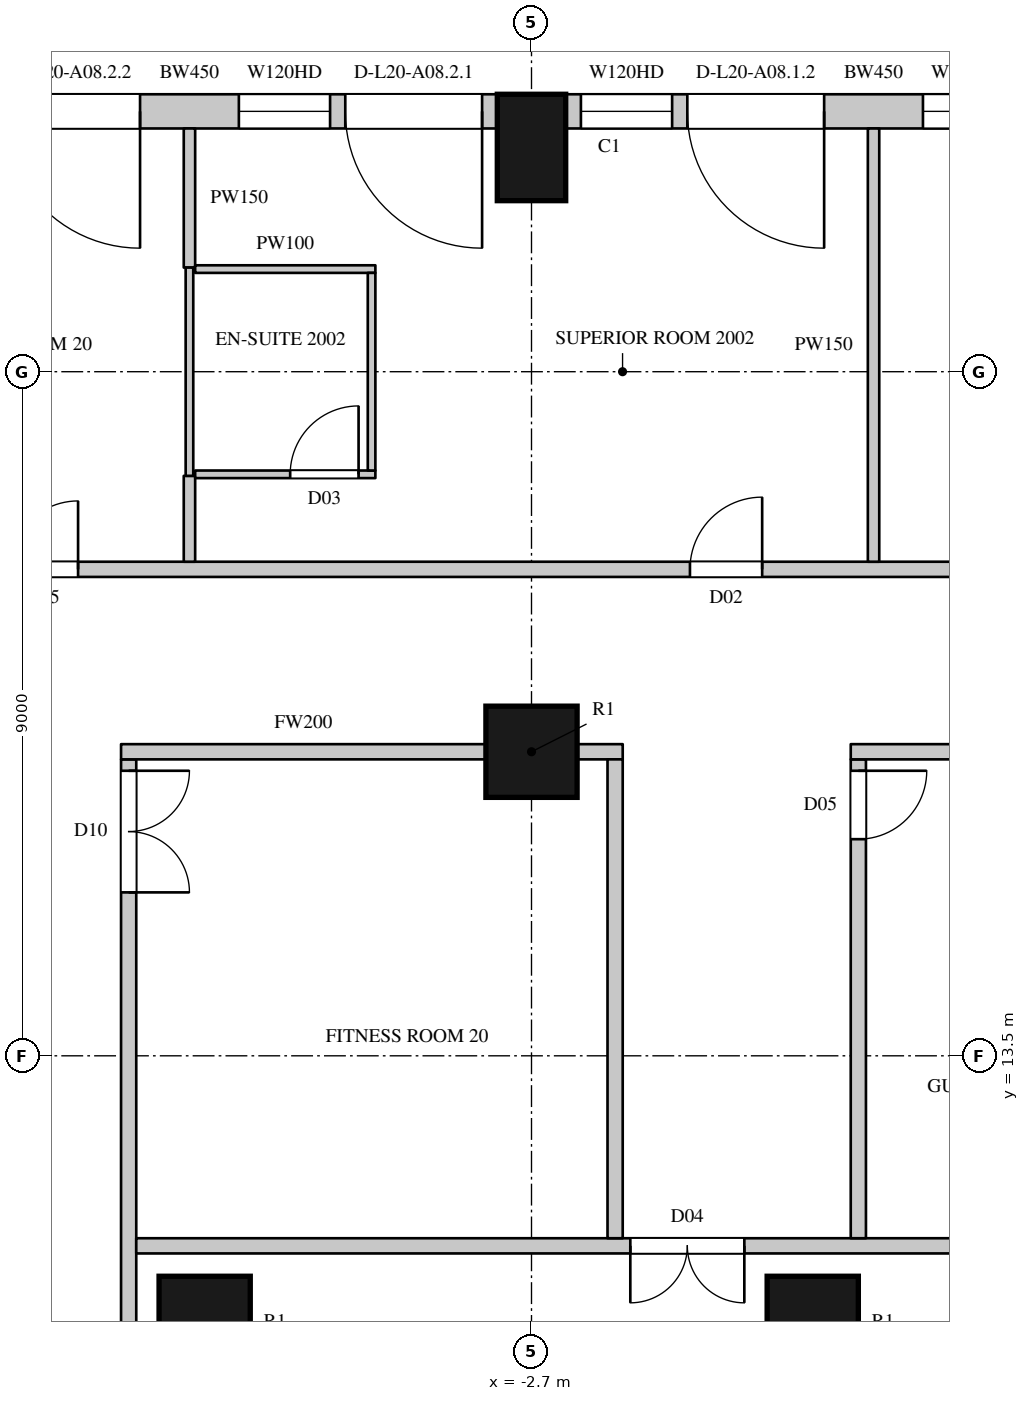
"""IFC4 building model, lengths in metres.
Left out: names, types, materials, properties, quantities, classifications, styles, units other than length and angle.
Written with IfcOpenShell. Run it as: python <this file> out.ifc"""

import sys

from ifc_helpers import new_model, si_unit, direction, frame, frame_2d, origin, origin_2d, place, context, subcontext, project, spatial, rectangle, circle, extrude, element, fill, save


model = new_model("IFC4")
c1 = context("Model", 3, precision=1e-05, world=origin(), true_north=direction((0.0, 1.0)))
c2 = subcontext(c1, "Body", "Model", "MODEL_VIEW")
j1 = project(units=[si_unit("LENGTHUNIT", "METRE"), si_unit("PLANEANGLEUNIT", "RADIAN")], contexts=[c1])
p1 = place(None, origin())
s1 = spatial("IfcSite", under=j1, at=p1, CompositionType="ELEMENT")
p2 = place(p1, origin())
s2 = spatial("IfcBuilding", under=s1, at=p2, CompositionType="ELEMENT")
p3 = place(p2, frame((0.0, 0.0, 102.3)))
s3 = spatial("IfcBuildingStorey", under=s2, at=p3, CompositionType="ELEMENT", Elevation=102.3)
p4 = place(p3, frame((-2.7, 25.45, 0.0), z_axis=(0.0, 0.0, 1.0), x_axis=(-1.0, 0.0, 0.0)))
e1 = element("IfcColumn", 1, at=p4, inside=s3, PredefinedType="COLUMN", context=c2, shape_type="SweptSolid", body=[
    extrude(rectangle(XDim=0.9, YDim=1.4, at=origin_2d()), origin(), (0.0, 0.0, 1.0), 3.6),
])
for number, where, z_axis, x_axis in (
    (2, (-2.7, 17.5, 0.0), (0.0, 0.0, 1.0), (1.0, 0.0, 0.0)),
    (3, (-7.0, 10.0, 0.0), (0.0, 0.0, 1.0), (1.0, 0.0, 0.0)),
    (4, (1.0, 10.0, 0.0), (0.0, 0.0, 1.0), (1.0, 0.0, 0.0)),
):
    element("IfcColumn", number, at=place(p3, frame(where, z_axis=z_axis, x_axis=x_axis)), inside=s3, PredefinedType="COLUMN", context=c2, shape_type="SweptSolid", body=[
        extrude(circle(Radius=0.6, at=origin_2d()), origin(), (0.0, 0.0, 1.0), 3.6),
    ])
p5 = place(p3, frame((5.85, 25.925, 0.0), z_axis=(0.0, 0.0, 1.0), x_axis=(-1.0, 0.0, 0.0)))
e5 = element("IfcWall", 5, at=p5, inside=s3, PredefinedType="SOLIDWALL", context=c2, shape_type="SweptSolid", body=[
    extrude(rectangle(XDim=8.1, YDim=0.45, at=frame_2d((4.05, 0.0))), origin(), (0.0, 0.0, 1.0), 3.3),
])
p6 = place(p5, frame((0.2, 0.0, 0.0)))
e6 = element("IfcOpeningElement", 6, at=p6, cuts=e5, PredefinedType="OPENING", context=c2, shape_type="SweptSolid", body=[
    extrude(rectangle(XDim=1.8, YDim=2.4, at=frame_2d((0.9, 1.2))), frame((0.0, 0.235, 0.0), z_axis=(0.0, -1.0, 0.0), x_axis=(1.0, 0.0, 0.0)), (0.0, 0.0, 1.0), 0.47),
])
p7 = place(p5, frame((2.2, 0.0, 1.05)))
e7 = element("IfcOpeningElement", 7, at=p7, cuts=e5, PredefinedType="OPENING", context=c2, shape_type="SweptSolid", body=[
    extrude(rectangle(XDim=1.2, YDim=2.0, at=frame_2d((0.6, 1.0))), frame((0.0, 0.235, 0.0), z_axis=(0.0, -1.0, 0.0), x_axis=(1.0, 0.0, 0.0)), (0.0, 0.0, 1.0), 0.47),
])
p8 = place(p5, frame((4.7, 0.0, 0.0)))
e8 = element("IfcOpeningElement", 8, at=p8, cuts=e5, PredefinedType="OPENING", context=c2, shape_type="SweptSolid", body=[
    extrude(rectangle(XDim=1.8, YDim=2.4, at=frame_2d((0.9, 1.2))), frame((0.0, 0.235, 0.0), z_axis=(0.0, -1.0, 0.0), x_axis=(1.0, 0.0, 0.0)), (0.0, 0.0, 1.0), 0.47),
])
p9 = place(p5, frame((6.7, 0.0, 1.05)))
e9 = element("IfcOpeningElement", 9, at=p9, cuts=e5, PredefinedType="OPENING", context=c2, shape_type="SweptSolid", body=[
    extrude(rectangle(XDim=1.2, YDim=2.0, at=frame_2d((0.6, 1.0))), frame((0.0, 0.235, 0.0), z_axis=(0.0, -1.0, 0.0), x_axis=(1.0, 0.0, 0.0)), (0.0, 0.0, 1.0), 0.47),
])
p10 = place(p3, frame((-3.15, 25.925, 0.0), z_axis=(0.0, 0.0, 1.0), x_axis=(-1.0, 0.0, 0.0)))
e10 = element("IfcWall", 10, at=p10, inside=s3, PredefinedType="SOLIDWALL", context=c2, shape_type="SweptSolid", body=[
    extrude(rectangle(XDim=8.1, YDim=0.45, at=frame_2d((4.05, 0.0))), origin(), (0.0, 0.0, 1.0), 3.3),
])
p11 = place(p10, frame((0.2, 0.0, 0.0)))
e11 = element("IfcOpeningElement", 11, at=p11, cuts=e10, PredefinedType="OPENING", context=c2, shape_type="SweptSolid", body=[
    extrude(rectangle(XDim=1.8, YDim=2.4, at=frame_2d((0.9, 1.2))), frame((0.0, 0.235, 0.0), z_axis=(0.0, -1.0, 0.0), x_axis=(1.0, 0.0, 0.0)), (0.0, 0.0, 1.0), 0.47),
])
p12 = place(p10, frame((2.2, 0.0, 1.05)))
e12 = element("IfcOpeningElement", 12, at=p12, cuts=e10, PredefinedType="OPENING", context=c2, shape_type="SweptSolid", body=[
    extrude(rectangle(XDim=1.2, YDim=2.0, at=frame_2d((0.6, 1.0))), frame((0.0, 0.235, 0.0), z_axis=(0.0, -1.0, 0.0), x_axis=(1.0, 0.0, 0.0)), (0.0, 0.0, 1.0), 0.47),
])
p13 = place(p10, frame((4.7, 0.0, 0.0)))
e13 = element("IfcOpeningElement", 13, at=p13, cuts=e10, PredefinedType="OPENING", context=c2, shape_type="SweptSolid", body=[
    extrude(rectangle(XDim=1.8, YDim=2.4, at=frame_2d((0.9, 1.2))), frame((0.0, 0.235, 0.0), z_axis=(0.0, -1.0, 0.0), x_axis=(1.0, 0.0, 0.0)), (0.0, 0.0, 1.0), 0.47),
])
p14 = place(p10, frame((6.7, 0.0, 1.05)))
e14 = element("IfcOpeningElement", 14, at=p14, cuts=e10, PredefinedType="OPENING", context=c2, shape_type="SweptSolid", body=[
    extrude(rectangle(XDim=1.2, YDim=2.0, at=frame_2d((0.6, 1.0))), frame((0.0, 0.235, 0.0), z_axis=(0.0, -1.0, 0.0), x_axis=(1.0, 0.0, 0.0)), (0.0, 0.0, 1.0), 0.47),
])
p15 = place(p3, frame((-23.765, 19.9, 0.0), z_axis=(0.0, 0.0, 1.0), x_axis=(1.0, 0.0, 0.0)))
e15 = element("IfcWall", 15, at=p15, inside=s3, PredefinedType="PARTITIONING", context=c2, shape_type="SweptSolid", body=[
    extrude(rectangle(XDim=41.549, YDim=0.2, at=frame_2d((20.774, 0.0))), origin(), (0.0, 0.0, 1.0), 3.3),
])
p16 = place(p15, frame((14.2, 0.0, 0.0)))
e16 = element("IfcOpeningElement", 16, at=p16, cuts=e15, PredefinedType="OPENING", context=c2, shape_type="SweptSolid", body=[
    extrude(rectangle(XDim=0.9, YDim=2.2, at=frame_2d((0.45, 1.1))), frame((0.0, 0.11, 0.0), z_axis=(0.0, -1.0, 0.0), x_axis=(1.0, 0.0, 0.0)), (0.0, 0.0, 1.0), 0.22),
])
p17 = place(p15, frame((27.05, 0.0, 0.0)))
e17 = element("IfcOpeningElement", 17, at=p17, cuts=e15, PredefinedType="OPENING", context=c2, shape_type="SweptSolid", body=[
    extrude(rectangle(XDim=0.9, YDim=2.2, at=frame_2d((0.45, 1.1))), frame((0.0, 0.11, 0.0), z_axis=(0.0, -1.0, 0.0), x_axis=(1.0, 0.0, 0.0)), (0.0, 0.0, 1.0), 0.22),
])
p18 = place(p15, frame((0.75, 0.0, 0.0)))
e18 = element("IfcOpeningElement", 18, at=p18, cuts=e15, PredefinedType="OPENING", context=c2, shape_type="SweptSolid", body=[
    extrude(rectangle(XDim=1.1, YDim=2.4, at=frame_2d((0.55, 1.2))), frame((0.0, 0.11, 0.0), z_axis=(0.0, -1.0, 0.0), x_axis=(1.0, 0.0, 0.0)), (0.0, 0.0, 1.0), 0.22),
])
p19 = place(p15, frame((23.15, 0.0, 0.0)))
e19 = element("IfcOpeningElement", 19, at=p19, cuts=e15, PredefinedType="OPENING", context=c2, shape_type="SweptSolid", body=[
    extrude(rectangle(XDim=0.95, YDim=2.2, at=frame_2d((0.475, 1.1))), frame((0.0, 0.11, 0.0), z_axis=(0.0, -1.0, 0.0), x_axis=(1.0, 0.0, 0.0)), (0.0, 0.0, 1.0), 0.22),
])
p20 = place(p15, frame((34.95, 0.0, 0.0)))
e20 = element("IfcOpeningElement", 20, at=p20, cuts=e15, PredefinedType="OPENING", context=c2, shape_type="SweptSolid", body=[
    extrude(rectangle(XDim=0.95, YDim=2.2, at=frame_2d((0.475, 1.1))), frame((0.0, 0.11, 0.0), z_axis=(0.0, -1.0, 0.0), x_axis=(1.0, 0.0, 0.0)), (0.0, 0.0, 1.0), 0.22),
])
p21 = place(p3, frame((-8.0, -10.9, 0.0), z_axis=(0.0, 0.0, 1.0), x_axis=(0.0, 1.0, 0.0)))
e21 = element("IfcWall", 21, at=p21, inside=s3, PredefinedType="PARTITIONING", context=c2, shape_type="SweptSolid", body=[
    extrude(rectangle(XDim=28.3, YDim=0.2, at=frame_2d((14.15, 0.0))), origin(), (0.0, 0.0, 1.0), 3.3),
])
p22 = place(p21, frame((14.65, 0.0, 0.0)))
e22 = element("IfcOpeningElement", 22, at=p22, cuts=e21, PredefinedType="OPENING", context=c2, shape_type="SweptSolid", body=[
    extrude(rectangle(XDim=1.5, YDim=2.2, at=frame_2d((0.75, 1.1))), frame((0.0, 0.11, 0.0), z_axis=(0.0, -1.0, 0.0), x_axis=(1.0, 0.0, 0.0)), (0.0, 0.0, 1.0), 0.22),
])
p23 = place(p21, frame((26.55, 0.0, 0.0)))
e23 = element("IfcOpeningElement", 23, at=p23, cuts=e21, PredefinedType="OPENING", context=c2, shape_type="SweptSolid", body=[
    extrude(rectangle(XDim=1.6, YDim=2.4, at=frame_2d((0.8, 1.2))), frame((0.0, 0.11, 0.0), z_axis=(0.0, -1.0, 0.0), x_axis=(1.0, 0.0, 0.0)), (0.0, 0.0, 1.0), 0.22),
])
p24 = place(p3, frame((-7.9, 11.0, 0.0), z_axis=(0.0, 0.0, 1.0), x_axis=(1.0, 0.0, 0.0)))
e24 = element("IfcWall", 24, at=p24, inside=s3, PredefinedType="PARTITIONING", context=c2, shape_type="SweptSolid", body=[
    extrude(rectangle(XDim=17.9, YDim=0.2, at=frame_2d((8.95, 0.0))), origin(), (0.0, 0.0, 1.0), 3.3),
])
p25 = place(p24, frame((6.5, 0.0, 0.0)))
e25 = element("IfcOpeningElement", 25, at=p25, cuts=e24, PredefinedType="OPENING", context=c2, shape_type="SweptSolid", body=[
    extrude(rectangle(XDim=1.5, YDim=2.2, at=frame_2d((0.75, 1.1))), frame((0.0, 0.11, 0.0), z_axis=(0.0, -1.0, 0.0), x_axis=(1.0, 0.0, 0.0)), (0.0, 0.0, 1.0), 0.22),
])
p26 = place(p3, frame((-8.1, 17.5, 0.0), z_axis=(0.0, 0.0, 1.0), x_axis=(1.0, 0.0, 0.0)))
e26 = element("IfcWall", 26, at=p26, inside=s3, PredefinedType="PARTITIONING", context=c2, shape_type="SweptSolid", body=[
    extrude(rectangle(XDim=4.8, YDim=0.2, at=frame_2d((2.4, 0.0))), origin(), (0.0, 0.0, 1.0), 2.75),
])
p27 = place(p3, frame((-2.1, 17.5, 0.0), z_axis=(0.0, 0.0, 1.0), x_axis=(1.0, 0.0, 0.0)))
e27 = element("IfcWall", 27, at=p27, inside=s3, PredefinedType="PARTITIONING", context=c2, shape_type="SweptSolid", body=[
    extrude(rectangle(XDim=0.6, YDim=0.2, at=frame_2d((0.3, 0.0))), origin(), (0.0, 0.0, 1.0), 2.75),
])
p28 = place(p3, frame((-1.6, 11.1, 0.0), z_axis=(0.0, 0.0, 1.0), x_axis=(0.0, 1.0, 0.0)))
e28 = element("IfcWall", 28, at=p28, inside=s3, PredefinedType="PARTITIONING", context=c2, shape_type="SweptSolid", body=[
    extrude(rectangle(XDim=6.3, YDim=0.2, at=frame_2d((3.15, 0.0))), origin(), (0.0, 0.0, 1.0), 3.3),
])
p29 = place(p3, frame((1.6, 11.1, 0.0), z_axis=(0.0, 0.0, 1.0), x_axis=(0.0, 1.0, 0.0)))
e29 = element("IfcWall", 29, at=p29, inside=s3, PredefinedType="PARTITIONING", context=c2, shape_type="SweptSolid", body=[
    extrude(rectangle(XDim=6.3, YDim=0.2, at=frame_2d((3.15, 0.0))), origin(), (0.0, 0.0, 1.0), 3.3),
])
p30 = place(p29, frame((5.25, 0.0, 0.0)))
e30 = element("IfcOpeningElement", 30, at=p30, cuts=e29, PredefinedType="OPENING", context=c2, shape_type="SweptSolid", body=[
    extrude(rectangle(XDim=0.9, YDim=2.2, at=frame_2d((0.45, 1.1))), frame((0.0, 0.11, 0.0), z_axis=(0.0, -1.0, 0.0), x_axis=(1.0, 0.0, 0.0)), (0.0, 0.0, 1.0), 0.22),
])
p31 = place(p3, frame((1.5, 17.5, 0.0), z_axis=(0.0, 0.0, 1.0), x_axis=(1.0, 0.0, 0.0)))
e31 = element("IfcWall", 31, at=p31, inside=s3, PredefinedType="PARTITIONING", context=c2, shape_type="SweptSolid", body=[
    extrude(rectangle(XDim=4.2, YDim=0.2, at=frame_2d((2.1, 0.0))), origin(), (0.0, 0.0, 1.0), 2.75),
])
p32 = place(p3, frame((-7.2, 20.0, 0.0), z_axis=(0.0, 0.0, 1.0), x_axis=(0.0, 1.0, 0.0)))
e32 = element("IfcWall", 32, at=p32, inside=s3, PredefinedType="PARTITIONING", context=c2, shape_type="SweptSolid", body=[
    extrude(rectangle(XDim=1.13, YDim=0.15, at=frame_2d((0.565, 0.0))), origin(), (0.0, 0.0, 1.0), 2.65),
])
p33 = place(p3, frame((-7.2, 23.87, 0.0), z_axis=(0.0, 0.0, 1.0), x_axis=(0.0, 1.0, 0.0)))
e33 = element("IfcWall", 33, at=p33, inside=s3, PredefinedType="PARTITIONING", context=c2, shape_type="SweptSolid", body=[
    extrude(rectangle(XDim=1.83, YDim=0.15, at=frame_2d((0.915, 0.0))), origin(), (0.0, 0.0, 1.0), 2.65),
])
p34 = place(p3, frame((1.8, 20.0, 0.0), z_axis=(0.0, 0.0, 1.0), x_axis=(0.0, 1.0, 0.0)))
e34 = element("IfcWall", 34, at=p34, inside=s3, PredefinedType="PARTITIONING", context=c2, shape_type="SweptSolid", body=[
    extrude(rectangle(XDim=5.7, YDim=0.15, at=frame_2d((2.85, 0.0))), origin(), (0.0, 0.0, 1.0), 2.65),
])
p35 = place(p3, frame((-7.2, 21.13, 0.0), z_axis=(0.0, 0.0, 1.0), x_axis=(0.0, 1.0, 0.0)))
e35 = element("IfcWall", 35, at=p35, inside=s3, PredefinedType="PARTITIONING", context=c2, shape_type="SweptSolid", body=[
    extrude(rectangle(XDim=2.74, YDim=0.1, at=frame_2d((1.37, 0.0))), origin(), (0.0, 0.0, 1.0), 2.65),
])
p36 = place(p3, frame((-7.125, 21.15, 0.0), z_axis=(0.0, 0.0, 1.0), x_axis=(1.0, 0.0, 0.0)))
e36 = element("IfcWall", 36, at=p36, inside=s3, PredefinedType="PARTITIONING", context=c2, shape_type="SweptSolid", body=[
    extrude(rectangle(XDim=2.371, YDim=0.1, at=frame_2d((1.186, 0.0))), origin(), (0.0, 0.0, 1.0), 3.3),
])
p37 = place(p36, frame((1.25, 0.0, 0.0)))
e37 = element("IfcOpeningElement", 37, at=p37, cuts=e36, PredefinedType="OPENING", context=c2, shape_type="SweptSolid", body=[
    extrude(rectangle(XDim=0.9, YDim=2.2, at=frame_2d((0.45, 1.1))), frame((0.0, 0.06, 0.0), z_axis=(0.0, -1.0, 0.0), x_axis=(1.0, 0.0, 0.0)), (0.0, 0.0, 1.0), 0.12),
])
p38 = place(p3, frame((-7.125, 23.85, 0.0), z_axis=(0.0, 0.0, 1.0), x_axis=(1.0, 0.0, 0.0)))
e38 = element("IfcWall", 38, at=p38, inside=s3, PredefinedType="PARTITIONING", context=c2, shape_type="SweptSolid", body=[
    extrude(rectangle(XDim=2.371, YDim=0.1, at=frame_2d((1.186, 0.0))), origin(), (0.0, 0.0, 1.0), 3.3),
])
p39 = place(p3, frame((-4.804, 21.2, 0.0), z_axis=(0.0, 0.0, 1.0), x_axis=(0.0, 1.0, 0.0)))
e39 = element("IfcWall", 39, at=p39, inside=s3, PredefinedType="PARTITIONING", context=c2, shape_type="SweptSolid", body=[
    extrude(rectangle(XDim=2.6, YDim=0.1, at=frame_2d((1.3, 0.0))), origin(), (0.0, 0.0, 1.0), 3.3),
])
p40 = place(p7, origin())
e40 = element("IfcWindow", 40, at=p40, inside=s3, PartitioningType="SINGLE_PANEL", PredefinedType="WINDOW", context=c2, shape_type="SweptSolid", body=[
    extrude(rectangle(XDim=1.2, YDim=2.0, at=frame_2d((0.6, 1.0))), frame((0.0, 0.135, 0.0), z_axis=(0.0, -1.0, 0.0), x_axis=(1.0, 0.0, 0.0)), (0.0, 0.0, 1.0), 0.06),
])
fill(e7, e40)
p41 = place(p8, origin())
e41 = element("IfcDoor", 41, at=p41, inside=s3, OperationType="SLIDING_TO_LEFT", PredefinedType="DOOR", context=c2, shape_type="SweptSolid", body=[
    extrude(rectangle(XDim=1.8, YDim=2.4, at=frame_2d((0.9, 1.2))), frame((0.0, 0.13, 0.0), z_axis=(0.0, -1.0, 0.0), x_axis=(1.0, 0.0, 0.0)), (0.0, 0.0, 1.0), 0.05),
])
fill(e8, e41)
p42 = place(p9, origin())
e42 = element("IfcWindow", 42, at=p42, inside=s3, PartitioningType="SINGLE_PANEL", PredefinedType="WINDOW", context=c2, shape_type="SweptSolid", body=[
    extrude(rectangle(XDim=1.2, YDim=2.0, at=frame_2d((0.6, 1.0))), frame((0.0, 0.135, 0.0), z_axis=(0.0, -1.0, 0.0), x_axis=(1.0, 0.0, 0.0)), (0.0, 0.0, 1.0), 0.06),
])
fill(e9, e42)
p43 = place(p11, origin())
e43 = element("IfcDoor", 43, at=p43, inside=s3, OperationType="SLIDING_TO_LEFT", PredefinedType="DOOR", context=c2, shape_type="SweptSolid", body=[
    extrude(rectangle(XDim=1.8, YDim=2.4, at=frame_2d((0.9, 1.2))), frame((0.0, 0.13, 0.0), z_axis=(0.0, -1.0, 0.0), x_axis=(1.0, 0.0, 0.0)), (0.0, 0.0, 1.0), 0.05),
])
fill(e11, e43)
p44 = place(p12, origin())
e44 = element("IfcWindow", 44, at=p44, inside=s3, PartitioningType="SINGLE_PANEL", PredefinedType="WINDOW", context=c2, shape_type="SweptSolid", body=[
    extrude(rectangle(XDim=1.2, YDim=2.0, at=frame_2d((0.6, 1.0))), frame((0.0, 0.135, 0.0), z_axis=(0.0, -1.0, 0.0), x_axis=(1.0, 0.0, 0.0)), (0.0, 0.0, 1.0), 0.06),
])
fill(e12, e44)
p45 = place(p13, origin())
e45 = element("IfcDoor", 45, at=p45, inside=s3, OperationType="SLIDING_TO_LEFT", PredefinedType="DOOR", context=c2, shape_type="SweptSolid", body=[
    extrude(rectangle(XDim=1.8, YDim=2.4, at=frame_2d((0.9, 1.2))), frame((0.0, 0.13, 0.0), z_axis=(0.0, -1.0, 0.0), x_axis=(1.0, 0.0, 0.0)), (0.0, 0.0, 1.0), 0.05),
])
fill(e13, e45)
p46 = place(p25, origin())
e46 = element("IfcDoor", 46, at=p46, inside=s3, OperationType="DOUBLE_DOOR_SINGLE_SWING", PredefinedType="DOOR", context=c2, shape_type="SweptSolid", body=[
    extrude(rectangle(XDim=1.5, YDim=2.2, at=frame_2d((0.75, 1.1))), frame((0.0, 0.025, 0.0), z_axis=(0.0, -1.0, 0.0), x_axis=(1.0, 0.0, 0.0)), (0.0, 0.0, 1.0), 0.05),
])
fill(e25, e46)
p47 = place(p23, origin())
e47 = element("IfcDoor", 47, at=p47, inside=s3, OperationType="DOUBLE_DOOR_SINGLE_SWING", PredefinedType="DOOR", context=c2, shape_type="SweptSolid", body=[
    extrude(rectangle(XDim=1.6, YDim=2.4, at=frame_2d((0.8, 1.2))), frame((0.0, 0.025, 0.0), z_axis=(0.0, -1.0, 0.0), x_axis=(1.0, 0.0, 0.0)), (0.0, 0.0, 1.0), 0.05),
])
fill(e23, e47)
p48 = place(p30, origin())
e48 = element("IfcDoor", 48, at=p48, inside=s3, OperationType="SINGLE_SWING_LEFT", PredefinedType="DOOR", context=c2, shape_type="SweptSolid", body=[
    extrude(rectangle(XDim=0.9, YDim=2.2, at=frame_2d((0.45, 1.1))), frame((0.0, 0.025, 0.0), z_axis=(0.0, -1.0, 0.0), x_axis=(1.0, 0.0, 0.0)), (0.0, 0.0, 1.0), 0.05),
])
fill(e30, e48)
p49 = place(p16, origin())
e49 = element("IfcDoor", 49, at=p49, inside=s3, OperationType="SINGLE_SWING_RIGHT", PredefinedType="DOOR", context=c2, shape_type="SweptSolid", body=[
    extrude(rectangle(XDim=0.9, YDim=2.2, at=frame_2d((0.45, 1.1))), frame((0.0, 0.025, 0.0), z_axis=(0.0, -1.0, 0.0), x_axis=(1.0, 0.0, 0.0)), (0.0, 0.0, 1.0), 0.05),
])
fill(e16, e49)
p50 = place(p19, origin())
e50 = element("IfcDoor", 50, at=p50, inside=s3, OperationType="SINGLE_SWING_RIGHT", PredefinedType="DOOR", context=c2, shape_type="SweptSolid", body=[
    extrude(rectangle(XDim=0.95, YDim=2.2, at=frame_2d((0.475, 1.1))), frame((0.0, 0.025, 0.0), z_axis=(0.0, -1.0, 0.0), x_axis=(1.0, 0.0, 0.0)), (0.0, 0.0, 1.0), 0.05),
])
fill(e19, e50)
p51 = place(p37, origin())
e51 = element("IfcDoor", 51, at=p51, inside=s3, OperationType="SINGLE_SWING_RIGHT", PredefinedType="DOOR", context=c2, shape_type="SweptSolid", body=[
    extrude(rectangle(XDim=0.9, YDim=2.2, at=frame_2d((0.45, 1.1))), frame((0.0, 0.025, 0.0), z_axis=(0.0, -1.0, 0.0), x_axis=(1.0, 0.0, 0.0)), (0.0, 0.0, 1.0), 0.05),
])
fill(e37, e51)
save(model, sys.argv[1])
